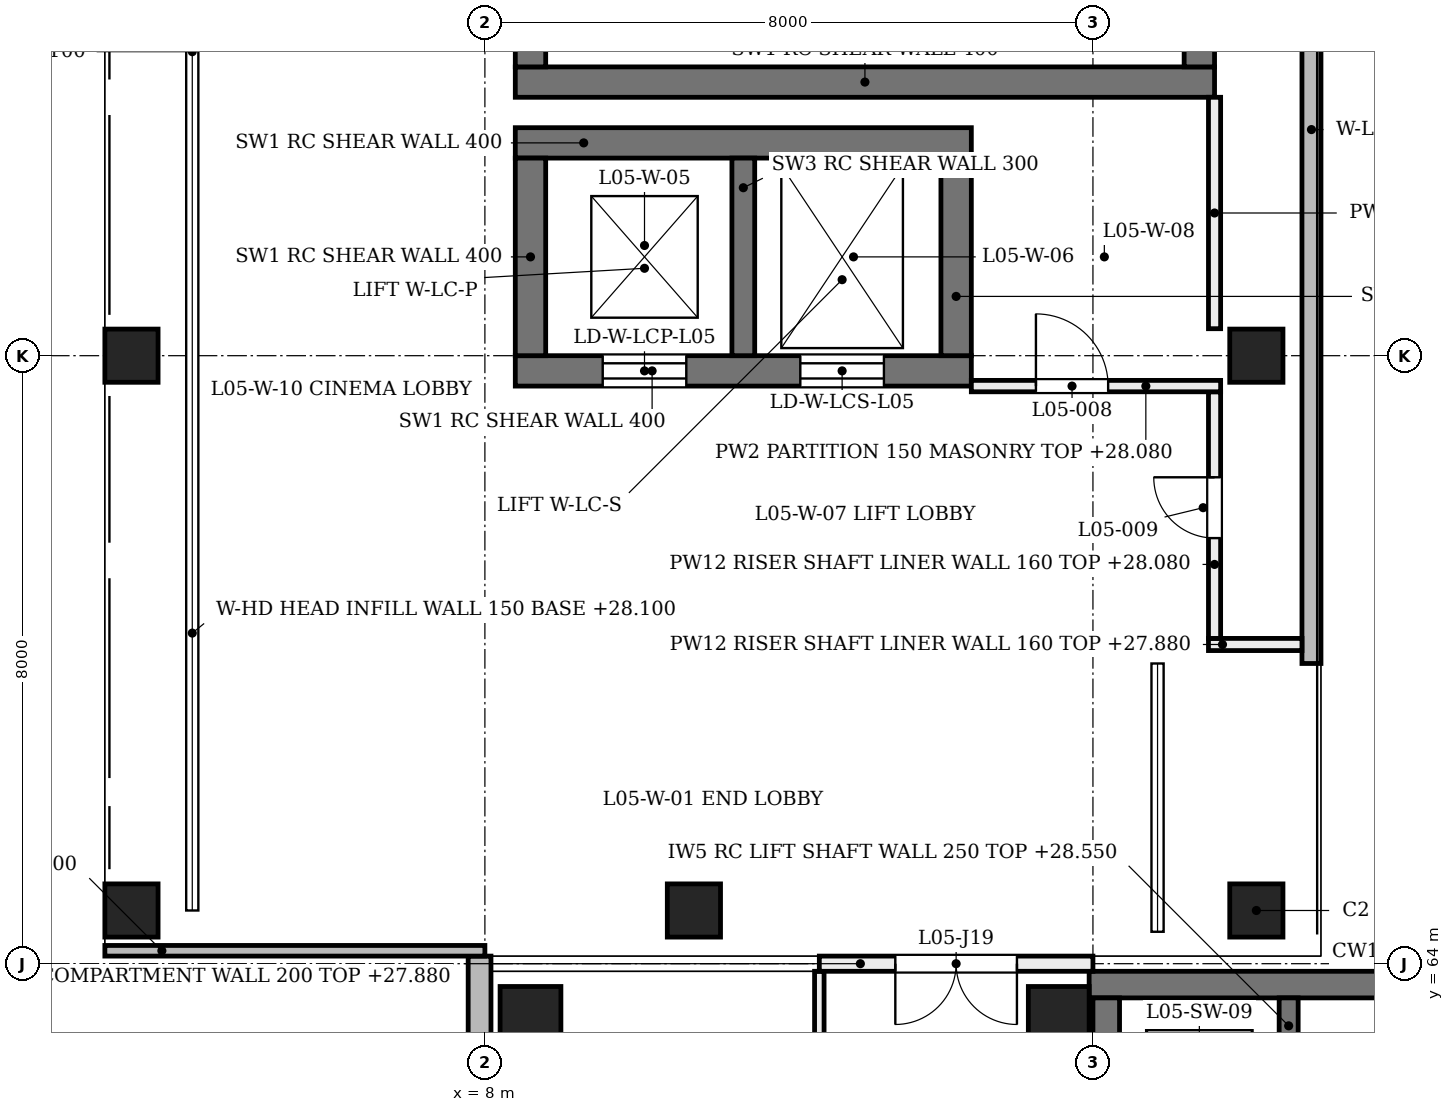
"""IFC4 building model, lengths in metres.
Left out: names, types, materials, properties, quantities, classifications, styles, units other than length and angle.
Written with IfcOpenShell. Run it as: python <this file> out.ifc"""

import sys

from ifc_helpers import new_model, si_unit, direction, frame, frame_2d, origin, origin_2d, place, context, subcontext, project, spatial, rectangle, extrude, element, fill, save


model = new_model("IFC4")
c1 = context("Model", 3, precision=1e-05, world=origin(), true_north=direction((0.0, 1.0)))
c2 = subcontext(c1, "Body", "Model", "MODEL_VIEW")
j1 = project(units=[si_unit("LENGTHUNIT", "METRE"), si_unit("PLANEANGLEUNIT", "RADIAN")], contexts=[c1])
p1 = place(None, origin())
s1 = spatial("IfcSite", under=j1, at=p1, CompositionType="ELEMENT")
p2 = place(p1, origin())
s2 = spatial("IfcBuilding", under=s1, at=p2, CompositionType="ELEMENT")
p3 = place(p2, frame((0.0, 0.0, 24.0)))
s3 = spatial("IfcBuildingStorey", under=s2, at=p3, CompositionType="ELEMENT", Elevation=24.0)
p4 = place(p3, frame((8.4, 75.6, 0.0), z_axis=(0.0, 0.0, 1.0), x_axis=(1.0, 0.0, 0.0)))
e1 = element("IfcWall", 1, at=p4, inside=s3, PredefinedType="SHEAR", context=c2, shape_type="SweptSolid", body=[
    extrude(rectangle(XDim=9.2, YDim=0.4, at=frame_2d((4.6, 0.0))), origin(), (0.0, 0.0, 1.0), 4.58),
])
for number, where, z_axis, x_axis in (
    (2, (8.6, 75.8, 0.0), (0.0, 0.0, 1.0), (0.0, 1.0, 0.0)),
    (3, (17.4, 75.8, 0.0), (0.0, 0.0, 1.0), (0.0, 1.0, 0.0)),
):
    element("IfcWall", number, at=place(p3, frame(where, z_axis=z_axis, x_axis=x_axis)), inside=s3, PredefinedType="SHEAR", context=c2, shape_type="SweptSolid", body=[
        extrude(rectangle(XDim=7.0, YDim=0.4, at=frame_2d((3.5, 0.0))), origin(), (0.0, 0.0, 1.0), 4.58),
    ])
p5 = place(p3, frame((8.4, 71.8, 0.0), z_axis=(0.0, 0.0, 1.0), x_axis=(1.0, 0.0, 0.0)))
e4 = element("IfcWall", 4, at=p5, inside=s3, PredefinedType="SHEAR", context=c2, shape_type="SweptSolid", body=[
    extrude(rectangle(XDim=6.0, YDim=0.4, at=frame_2d((3.0, 0.0))), origin(), (0.0, 0.0, 1.0), 4.58),
])
p6 = place(p5, frame((1.15, 0.0, 0.0)))
e5 = element("IfcOpeningElement", 5, at=p6, cuts=e4, PredefinedType="OPENING", context=c2, shape_type="SweptSolid", body=[
    extrude(rectangle(XDim=1.1, YDim=2.1, at=frame_2d((0.55, 1.05))), frame((0.0, 0.21, 0.0), z_axis=(0.0, -1.0, 0.0), x_axis=(1.0, 0.0, 0.0)), (0.0, 0.0, 1.0), 0.42),
])
p7 = place(p5, frame((3.75, 0.0, 0.0)))
e6 = element("IfcOpeningElement", 6, at=p7, cuts=e4, PredefinedType="OPENING", context=c2, shape_type="SweptSolid", body=[
    extrude(rectangle(XDim=1.1, YDim=2.1, at=frame_2d((0.55, 1.05))), frame((0.0, 0.21, 0.0), z_axis=(0.0, -1.0, 0.0), x_axis=(1.0, 0.0, 0.0)), (0.0, 0.0, 1.0), 0.42),
])
p8 = place(p3, frame((8.4, 74.8, 0.0), z_axis=(0.0, 0.0, 1.0), x_axis=(1.0, 0.0, 0.0)))
e7 = element("IfcWall", 7, at=p8, inside=s3, PredefinedType="SHEAR", context=c2, shape_type="SweptSolid", body=[
    extrude(rectangle(XDim=6.0, YDim=0.4, at=frame_2d((3.0, 0.0))), origin(), (0.0, 0.0, 1.0), 4.58),
])
for number, where, z_axis, x_axis in (
    (8, (8.6, 72.0, 0.0), (0.0, 0.0, 1.0), (0.0, 1.0, 0.0)),
    (9, (14.2, 72.0, 0.0), (0.0, 0.0, 1.0), (0.0, 1.0, 0.0)),
):
    element("IfcWall", number, at=place(p3, frame(where, z_axis=z_axis, x_axis=x_axis)), inside=s3, PredefinedType="SHEAR", context=c2, shape_type="SweptSolid", body=[
        extrude(rectangle(XDim=2.6, YDim=0.4, at=frame_2d((1.3, 0.0))), origin(), (0.0, 0.0, 1.0), 4.58),
    ])
p9 = place(p3, frame((11.4, 72.0, 0.0), z_axis=(0.0, 0.0, 1.0), x_axis=(0.0, 1.0, 0.0)))
e10 = element("IfcWall", 10, at=p9, inside=s3, PredefinedType="SHEAR", context=c2, shape_type="SweptSolid", body=[
    extrude(rectangle(XDim=2.6, YDim=0.3, at=frame_2d((1.3, 0.0))), origin(), (0.0, 0.0, 1.0), 4.58),
])
p10 = place(p3, frame((15.95, 63.725, 0.0), z_axis=(0.0, 0.0, 1.0), x_axis=(1.0, 0.0, 0.0)))
e11 = element("IfcWall", 11, at=p10, inside=s3, PredefinedType="SHEAR", context=c2, shape_type="SweptSolid", body=[
    extrude(rectangle(XDim=7.95, YDim=0.35, at=frame_2d((3.975, 0.0))), origin(), (0.0, 0.0, 1.0), 4.58),
])
p11 = place(p3, frame((16.175, 48.35, 0.0), z_axis=(0.0, 0.0, 1.0), x_axis=(0.0, 1.0, 0.0)))
e12 = element("IfcWall", 12, at=p11, inside=s3, PredefinedType="SHEAR", context=c2, shape_type="SweptSolid", body=[
    extrude(rectangle(XDim=15.2, YDim=0.35, at=frame_2d((7.6, 0.0))), origin(), (0.0, 0.0, 1.0), 4.58),
])
p12 = place(p11, frame((0.95, 0.0, 0.0)))
e13 = element("IfcOpeningElement", 13, at=p12, cuts=e12, PredefinedType="OPENING", context=c2, shape_type="SweptSolid", body=[
    extrude(rectangle(XDim=1.0, YDim=2.1, at=frame_2d((0.5, 1.05))), frame((0.0, 0.185, 0.0), z_axis=(0.0, -1.0, 0.0), x_axis=(1.0, 0.0, 0.0)), (0.0, 0.0, 1.0), 0.37),
])
p13 = place(p11, frame((10.6, 0.0, 0.0)))
e14 = element("IfcOpeningElement", 14, at=p13, cuts=e12, PredefinedType="OPENING", context=c2, shape_type="SweptSolid", body=[
    extrude(rectangle(XDim=1.4, YDim=2.1, at=frame_2d((0.7, 1.05))), frame((0.0, 0.185, 0.0), z_axis=(0.0, -1.0, 0.0), x_axis=(1.0, 0.0, 0.0)), (0.0, 0.0, 1.0), 0.37),
])
for number, where, z_axis, x_axis in (
    (15, (8.6, 63.3, 0.0), (0.0, 0.0, 1.0), (1.0, 0.0, 0.0)),
    (16, (15.55, 63.3, 0.0), (0.0, 0.0, 1.0), (1.0, 0.0, 0.0)),
):
    element("IfcColumn", number, at=place(p3, frame(where, z_axis=z_axis, x_axis=x_axis)), inside=s3, PredefinedType="COLUMN", context=c2, shape_type="SweptSolid", body=[
        extrude(rectangle(XDim=0.8, YDim=0.8, at=origin_2d()), origin(), (0.0, 0.0, 1.0), 4.8),
    ])
for number, where, z_axis, x_axis in (
    (17, (3.6, 64.7, 0.0), (-0.204, 0.0, 0.979), (0.0, -1.0, 0.0)),
    (18, (3.6, 72.0, 0.0), (-0.204, 0.0, 0.979), (0.0, -1.0, 0.0)),
    (19, (11.0, 64.7, 0.0), (-0.204, 0.0, 0.979), (0.0, -1.0, 0.0)),
    (20, (18.4, 64.7, 0.0), (-0.204, 0.0, 0.979), (0.0, -1.0, 0.0)),
    (21, (18.4, 72.0, 0.0), (-0.204, 0.0, 0.979), (0.0, -1.0, 0.0)),
):
    element("IfcColumn", number, at=place(p3, frame(where, z_axis=z_axis, x_axis=x_axis)), inside=s3, PredefinedType="COLUMN", context=c2, shape_type="SweptSolid", body=[
        extrude(rectangle(XDim=0.7, YDim=0.7, at=origin_2d()), origin(), (0.0, 0.0, 1.0), 4.678),
    ])
p14 = place(p3, frame((4.15, 64.9, 4.1), z_axis=(0.0, 0.0, 1.0), x_axis=(0.0, 1.0, 0.0)))
e22 = element("IfcWall", 22, at=p14, inside=s3, PredefinedType="SOLIDWALL", context=c2, shape_type="SweptSolid", body=[
    extrude(rectangle(XDim=6.9, YDim=0.15, at=frame_2d((3.45, 0.0))), origin(), (0.0, 0.0, 1.0), 0.48),
])
p15 = place(p3, frame((4.15, 72.2, 4.1), z_axis=(0.0, 0.0, 1.0), x_axis=(0.0, 1.0, 0.0)))
e23 = element("IfcWall", 23, at=p15, inside=s3, PredefinedType="SOLIDWALL", context=c2, shape_type="SweptSolid", body=[
    extrude(rectangle(XDim=7.6, YDim=0.15, at=frame_2d((3.8, 0.0))), origin(), (0.0, 0.0, 1.0), 0.48),
])
p16 = place(p3, frame((18.875, 67.95, 0.0), z_axis=(0.0, 0.0, 1.0), x_axis=(0.0, 1.0, 0.0)))
e24 = element("IfcWall", 24, at=p16, inside=s3, PredefinedType="SOLIDWALL", context=c2, shape_type="SweptSolid", body=[
    extrude(rectangle(XDim=24.1, YDim=0.25, at=frame_2d((12.05, 0.0))), origin(), (0.0, 0.0, 1.0), 3.9),
])
p17 = place(p3, frame((7.93, 47.7, 0.0), z_axis=(0.0, 0.0, 1.0), x_axis=(0.0, 1.0, 0.0)))
e25 = element("IfcWall", 25, at=p17, inside=s3, PredefinedType="SOLIDWALL", context=c2, shape_type="SweptSolid", body=[
    extrude(rectangle(XDim=16.4, YDim=0.3, at=frame_2d((8.2, 0.0))), origin(), (0.0, 0.0, 1.0), 3.9),
])
p18 = place(p17, frame((0.9, 0.0, 0.75)))
e26 = element("IfcOpeningElement", 26, at=p18, cuts=e25, PredefinedType="OPENING", context=c2, shape_type="SweptSolid", body=[
    extrude(rectangle(XDim=0.9, YDim=3.1, at=frame_2d((0.45, 1.55))), frame((0.0, 0.16, 0.0), z_axis=(0.0, -1.0, 0.0), x_axis=(1.0, 0.0, 0.0)), (0.0, 0.0, 1.0), 0.32),
])
p19 = place(p17, frame((3.6, 0.0, 0.75)))
e27 = element("IfcOpeningElement", 27, at=p19, cuts=e25, PredefinedType="OPENING", context=c2, shape_type="SweptSolid", body=[
    extrude(rectangle(XDim=0.9, YDim=3.1, at=frame_2d((0.45, 1.55))), frame((0.0, 0.16, 0.0), z_axis=(0.0, -1.0, 0.0), x_axis=(1.0, 0.0, 0.0)), (0.0, 0.0, 1.0), 0.32),
])
p20 = place(p17, frame((6.3, 0.0, 0.75)))
e28 = element("IfcOpeningElement", 28, at=p20, cuts=e25, PredefinedType="OPENING", context=c2, shape_type="SweptSolid", body=[
    extrude(rectangle(XDim=0.9, YDim=3.1, at=frame_2d((0.45, 1.55))), frame((0.0, 0.16, 0.0), z_axis=(0.0, -1.0, 0.0), x_axis=(1.0, 0.0, 0.0)), (0.0, 0.0, 1.0), 0.32),
])
p21 = place(p17, frame((9.0, 0.0, 0.75)))
e29 = element("IfcOpeningElement", 29, at=p21, cuts=e25, PredefinedType="OPENING", context=c2, shape_type="SweptSolid", body=[
    extrude(rectangle(XDim=0.9, YDim=3.1, at=frame_2d((0.45, 1.55))), frame((0.0, 0.16, 0.0), z_axis=(0.0, -1.0, 0.0), x_axis=(1.0, 0.0, 0.0)), (0.0, 0.0, 1.0), 0.32),
])
p22 = place(p17, frame((11.7, 0.0, 0.75)))
e30 = element("IfcOpeningElement", 30, at=p22, cuts=e25, PredefinedType="OPENING", context=c2, shape_type="SweptSolid", body=[
    extrude(rectangle(XDim=0.9, YDim=3.1, at=frame_2d((0.45, 1.55))), frame((0.0, 0.16, 0.0), z_axis=(0.0, -1.0, 0.0), x_axis=(1.0, 0.0, 0.0)), (0.0, 0.0, 1.0), 0.32),
])
p23 = place(p17, frame((14.4, 0.0, 0.75)))
e31 = element("IfcOpeningElement", 31, at=p23, cuts=e25, PredefinedType="OPENING", context=c2, shape_type="SweptSolid", body=[
    extrude(rectangle(XDim=0.9, YDim=3.1, at=frame_2d((0.45, 1.55))), frame((0.0, 0.16, 0.0), z_axis=(0.0, -1.0, 0.0), x_axis=(1.0, 0.0, 0.0)), (0.0, 0.0, 1.0), 0.32),
])
p24 = place(p3, frame((3.0, 64.17, 0.0), z_axis=(0.0, 0.0, 1.0), x_axis=(1.0, 0.0, 0.0)))
e32 = element("IfcWall", 32, at=p24, inside=s3, PredefinedType="SOLIDWALL", context=c2, shape_type="SweptSolid", body=[
    extrude(rectangle(XDim=5.0, YDim=0.14, at=frame_2d((2.5, 0.0))), origin(), (0.0, 0.0, 1.0), 3.9),
])
p25 = place(p3, frame((18.575, 61.1, 0.0), z_axis=(0.0, 0.0, 1.0), x_axis=(0.0, 1.0, 0.0)))
e33 = element("IfcWall", 33, at=p25, inside=s3, PredefinedType="SOLIDWALL", context=c2, shape_type="SweptSolid", body=[
    extrude(rectangle(XDim=2.45, YDim=0.25, at=frame_2d((1.225, 0.0))), origin(), (0.0, 0.0, 1.0), 4.55),
])
p26 = place(p3, frame((17.52, 68.2, 0.0), z_axis=(0.0, 0.0, 1.0), x_axis=(1.0, 0.0, 0.0)))
e34 = element("IfcWall", 34, at=p26, inside=s3, PredefinedType="PARTITIONING", context=c2, shape_type="SweptSolid", body=[
    extrude(rectangle(XDim=1.23, YDim=0.16, at=frame_2d((0.615, 0.0))), origin(), (0.0, 0.0, 1.0), 3.88),
])
p27 = place(p3, frame((17.6, 68.28, 0.0), z_axis=(0.0, 0.0, 1.0), x_axis=(0.0, 1.0, 0.0)))
e35 = element("IfcWall", 35, at=p27, inside=s3, PredefinedType="PARTITIONING", context=c2, shape_type="SweptSolid", body=[
    extrude(rectangle(XDim=3.245, YDim=0.16, at=frame_2d((1.623, 0.0))), origin(), (0.0, 0.0, 1.0), 4.08),
])
p28 = place(p27, frame((1.32, 0.0, 0.0)))
e36 = element("IfcOpeningElement", 36, at=p28, cuts=e35, PredefinedType="OPENING", context=c2, shape_type="SweptSolid", body=[
    extrude(rectangle(XDim=0.8, YDim=2.1, at=frame_2d((0.4, 1.05))), frame((0.0, 0.09, 0.0), z_axis=(0.0, -1.0, 0.0), x_axis=(1.0, 0.0, 0.0)), (0.0, 0.0, 1.0), 0.18),
])
p29 = place(p3, frame((17.6, 72.355, 0.0), z_axis=(0.0, 0.0, 1.0), x_axis=(0.0, 1.0, 0.0)))
e37 = element("IfcWall", 37, at=p29, inside=s3, PredefinedType="PARTITIONING", context=c2, shape_type="SweptSolid", body=[
    extrude(rectangle(XDim=3.045, YDim=0.16, at=frame_2d((1.522, 0.0))), origin(), (0.0, 0.0, 1.0), 4.08),
])
p30 = place(p3, frame((14.4, 71.6, 0.0), z_axis=(0.0, 0.0, 1.0), x_axis=(1.0, 0.0, 0.0)))
e38 = element("IfcWall", 38, at=p30, inside=s3, PredefinedType="PARTITIONING", context=c2, shape_type="SweptSolid", body=[
    extrude(rectangle(XDim=3.28, YDim=0.15, at=frame_2d((1.64, 0.0))), origin(), (0.0, 0.0, 1.0), 4.08),
])
p31 = place(p30, frame((0.85, 0.0, 0.0)))
e39 = element("IfcOpeningElement", 39, at=p31, cuts=e38, PredefinedType="OPENING", context=c2, shape_type="SweptSolid", body=[
    extrude(rectangle(XDim=0.95, YDim=2.1, at=frame_2d((0.475, 1.05))), frame((0.0, 0.085, 0.0), z_axis=(0.0, -1.0, 0.0), x_axis=(1.0, 0.0, 0.0)), (0.0, 0.0, 1.0), 0.17),
])
p32 = place(p3, frame((12.4, 53.986, 0.0), z_axis=(0.0, 0.0, 1.0), x_axis=(0.0, 1.0, 0.0)))
e40 = element("IfcWall", 40, at=p32, inside=s3, PredefinedType="PARTITIONING", context=c2, shape_type="SweptSolid", body=[
    extrude(rectangle(XDim=9.914, YDim=0.125, at=frame_2d((4.957, 0.0))), origin(), (0.0, 0.0, 1.0), 3.88),
])
p33 = place(p32, frame((2.207, 0.0, 0.0)))
e41 = element("IfcOpeningElement", 41, at=p33, cuts=e40, PredefinedType="OPENING", context=c2, shape_type="SweptSolid", body=[
    extrude(rectangle(XDim=1.0, YDim=2.1, at=frame_2d((0.5, 1.05))), frame((0.0, 0.073, 0.0), z_axis=(0.0, -1.0, 0.0), x_axis=(1.0, 0.0, 0.0)), (0.0, 0.0, 1.0), 0.145),
])
p34 = place(p32, frame((7.195, 0.0, 0.0)))
e42 = element("IfcOpeningElement", 42, at=p34, cuts=e40, PredefinedType="OPENING", context=c2, shape_type="SweptSolid", body=[
    extrude(rectangle(XDim=1.0, YDim=2.1, at=frame_2d((0.5, 1.05))), frame((0.0, 0.073, 0.0), z_axis=(0.0, -1.0, 0.0), x_axis=(1.0, 0.0, 0.0)), (0.0, 0.0, 1.0), 0.145),
])
p35 = place(p3, frame((12.4, 64.0, 0.0), z_axis=(0.0, 0.0, 1.0), x_axis=(1.0, 0.0, 0.0)))
e43 = element("IfcWall", 43, at=p35, inside=s3, PredefinedType="PARTITIONING", context=c2, shape_type="SweptSolid", body=[
    extrude(rectangle(XDim=3.6, YDim=0.2, at=frame_2d((1.8, 0.0))), origin(), (0.0, 0.0, 1.0), 3.88),
])
p36 = place(p35, frame((1.0, 0.0, 0.0)))
e44 = element("IfcOpeningElement", 44, at=p36, cuts=e43, PredefinedType="OPENING", context=c2, shape_type="SweptSolid", body=[
    extrude(rectangle(XDim=1.6, YDim=2.1, at=frame_2d((0.8, 1.05))), frame((0.0, 0.11, 0.0), z_axis=(0.0, -1.0, 0.0), x_axis=(1.0, 0.0, 0.0)), (0.0, 0.0, 1.0), 0.22),
])
p37 = place(p2, frame((0.0, 0.0, 19.2)))
s4 = spatial("IfcBuildingStorey", under=s2, at=p37, CompositionType="ELEMENT", Elevation=19.2)
p38 = place(p37, frame((9.0, 75.8, 0.0), z_axis=(0.0, 0.0, 1.0), x_axis=(0.0, 1.0, 0.0)))
e45 = element("IfcWall", 45, at=p38, inside=s4, PredefinedType="PARTITIONING", context=c2, shape_type="SweptSolid", body=[
    extrude(rectangle(XDim=7.0, YDim=0.3, at=frame_2d((3.5, 0.0))), origin(), (0.0, 0.0, 1.0), 6.95),
])
p39 = place(p6, frame((1.1, 0.0, 0.0), z_axis=(0.0, 0.0, 1.0), x_axis=(-1.0, 0.0, 0.0)))
e46 = element("IfcDoor", 46, at=p39, inside=s3, OperationType="DOUBLE_DOOR_SLIDING", PredefinedType="DOOR", context=c2, shape_type="SweptSolid", body=[
    extrude(rectangle(XDim=1.1, YDim=2.1, at=frame_2d((0.55, 1.05))), frame((0.0, 0.025, 0.0), z_axis=(0.0, -1.0, 0.0), x_axis=(1.0, 0.0, 0.0)), (0.0, 0.0, 1.0), 0.05),
])
fill(e5, e46)
p40 = place(p7, frame((1.1, 0.0, 0.0), z_axis=(0.0, 0.0, 1.0), x_axis=(-1.0, 0.0, 0.0)))
e47 = element("IfcDoor", 47, at=p40, inside=s3, OperationType="DOUBLE_DOOR_SLIDING", PredefinedType="DOOR", context=c2, shape_type="SweptSolid", body=[
    extrude(rectangle(XDim=1.1, YDim=2.1, at=frame_2d((0.55, 1.05))), frame((0.0, 0.025, 0.0), z_axis=(0.0, -1.0, 0.0), x_axis=(1.0, 0.0, 0.0)), (0.0, 0.0, 1.0), 0.05),
])
fill(e6, e47)
p41 = place(p31, origin())
e48 = element("IfcDoor", 48, at=p41, inside=s3, OperationType="SINGLE_SWING_LEFT", PredefinedType="DOOR", context=c2, shape_type="SweptSolid", body=[
    extrude(rectangle(XDim=0.95, YDim=2.1, at=frame_2d((0.475, 1.05))), frame((0.0, 0.025, 0.0), z_axis=(0.0, -1.0, 0.0), x_axis=(1.0, 0.0, 0.0)), (0.0, 0.0, 1.0), 0.05),
])
fill(e39, e48)
p42 = place(p28, frame((0.8, 0.0, 0.0), z_axis=(0.0, 0.0, 1.0), x_axis=(-1.0, 0.0, 0.0)))
e49 = element("IfcDoor", 49, at=p42, inside=s3, OperationType="SINGLE_SWING_RIGHT", PredefinedType="DOOR", context=c2, shape_type="SweptSolid", body=[
    extrude(rectangle(XDim=0.8, YDim=2.1, at=frame_2d((0.4, 1.05))), frame((0.0, 0.025, 0.0), z_axis=(0.0, -1.0, 0.0), x_axis=(1.0, 0.0, 0.0)), (0.0, 0.0, 1.0), 0.05),
])
fill(e36, e49)
p43 = place(p36, frame((1.6, 0.0, 0.0), z_axis=(0.0, 0.0, 1.0), x_axis=(-1.0, 0.0, 0.0)))
e50 = element("IfcDoor", 50, at=p43, inside=s3, OperationType="DOUBLE_DOOR_SINGLE_SWING", PredefinedType="DOOR", context=c2, shape_type="SweptSolid", body=[
    extrude(rectangle(XDim=1.6, YDim=2.1, at=frame_2d((0.8, 1.05))), frame((0.0, 0.025, 0.0), z_axis=(0.0, -1.0, 0.0), x_axis=(1.0, 0.0, 0.0)), (0.0, 0.0, 1.0), 0.05),
])
fill(e44, e50)
save(model, sys.argv[1])
